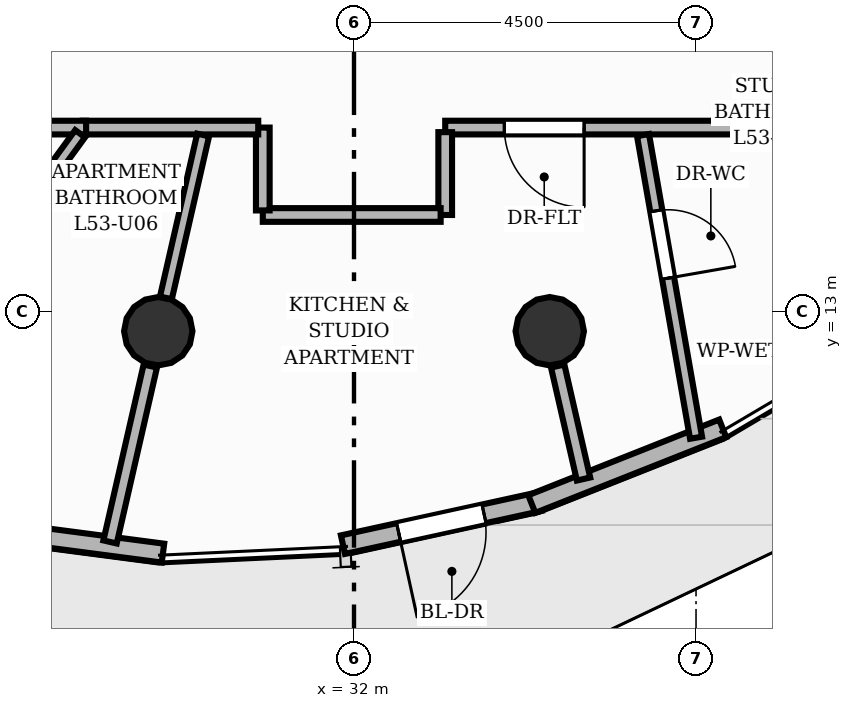
"""IFC4 building model, lengths in metres.
Left out: names, types, materials, properties, quantities, classifications, styles, units other than length and angle.
Written with IfcOpenShell. Run it as: python <this file> out.ifc"""

import sys

from ifc_helpers import new_model, si_unit, direction, frame, frame_2d, origin, origin_2d, place, context, subcontext, project, spatial, rectangle, circle, extrude, element, fill, save


model = new_model("IFC4")
c1 = context("Model", 3, precision=1e-05, world=origin(), true_north=direction((0.0, 1.0)))
c2 = subcontext(c1, "Body", "Model", "MODEL_VIEW")
j1 = project(units=[si_unit("LENGTHUNIT", "METRE"), si_unit("PLANEANGLEUNIT", "RADIAN")], contexts=[c1])
p1 = place(None, origin())
s1 = spatial("IfcSite", under=j1, at=p1, CompositionType="ELEMENT")
p2 = place(p1, origin())
s2 = spatial("IfcBuilding", under=s1, at=p2, CompositionType="ELEMENT")
p3 = place(p2, frame((0.0, 0.0, 179.04)))
s3 = spatial("IfcBuildingStorey", under=s2, at=p3, CompositionType="ELEMENT", Elevation=179.04)
for number, where, z_axis, x_axis in (
    (1, (29.425, 12.74, 0.0), (0.0, 0.0, 1.0), (1.0, 0.0, 0.0)),
    (2, (34.575, 12.74, 0.0), (0.0, 0.0, 1.0), (1.0, 0.0, 0.0)),
):
    element("IfcColumn", number, at=place(p3, frame(where, z_axis=z_axis, x_axis=x_axis)), inside=s3, PredefinedType="COLUMN", context=c2, shape_type="SweptSolid", body=[
        extrude(circle(Radius=0.45, at=origin_2d()), origin(), (0.0, 0.0, 1.0), 3.2),
    ])
p4 = place(p3, frame((29.487, 9.821, 0.0), z_axis=(0.0, 0.0, 1.0), x_axis=(-0.991491995227, 0.130167674176, 0.0)))
e3 = element("IfcWall", 3, at=p4, inside=s3, PredefinedType="SOLIDWALL", context=c2, shape_type="SweptSolid", body=[
    extrude(rectangle(XDim=2.532, YDim=0.25, at=frame_2d((1.266, 0.0))), origin(), (0.0, 0.0, 1.0), 2.96),
])
p5 = place(p3, frame((34.444, 10.499, 0.0), z_axis=(0.0, 0.0, 1.0), x_axis=(-0.976886196324, -0.213760051067, 0.0)))
e4 = element("IfcWall", 4, at=p5, inside=s3, PredefinedType="SOLIDWALL", context=c2, shape_type="SweptSolid", body=[
    extrude(rectangle(XDim=2.651, YDim=0.25, at=frame_2d((1.325, 0.0))), origin(), (0.0, 0.0, 1.0), 2.96),
])
p6 = place(p5, frame((0.751, 0.0, 0.0)))
e5 = element("IfcOpeningElement", 5, at=p6, cuts=e4, PredefinedType="OPENING", context=c2, shape_type="SweptSolid", body=[
    extrude(rectangle(XDim=1.15, YDim=2.2, at=frame_2d((0.575, 1.1))), frame((0.0, 0.135, 0.0), z_axis=(0.0, -1.0, 0.0), x_axis=(1.0, 0.0, 0.0)), (0.0, 0.0, 1.0), 0.27),
])
p7 = place(p3, frame((36.851, 11.462, 0.0), z_axis=(0.0, 0.0, 1.0), x_axis=(-0.929693178164, -0.368334894459, 0.0)))
e6 = element("IfcWall", 6, at=p7, inside=s3, PredefinedType="SOLIDWALL", context=c2, shape_type="SweptSolid", body=[
    extrude(rectangle(XDim=2.702, YDim=0.25, at=frame_2d((1.351, 0.0))), origin(), (0.0, 0.0, 1.0), 2.96),
])
p8 = place(p3, frame((29.32, 12.282, 0.0), z_axis=(0.0, 0.0, 1.0), x_axis=(-0.223011847659, -0.974815734282, 0.0)))
e7 = element("IfcWall", 7, at=p8, inside=s3, PredefinedType="PARTITIONING", context=c2, shape_type="SweptSolid", body=[
    extrude(rectangle(XDim=2.375, YDim=0.18, at=frame_2d((1.187, 0.0))), origin(), (0.0, 0.0, 1.0), 2.403),
])
p9 = place(p3, frame((34.68, 12.282, 0.0), z_axis=(0.0, 0.0, 1.0), x_axis=(0.222976920769, -0.974823723965, 0.0)))
e8 = element("IfcWall", 8, at=p9, inside=s3, PredefinedType="PARTITIONING", context=c2, shape_type="SweptSolid", body=[
    extrude(rectangle(XDim=1.525, YDim=0.18, at=frame_2d((0.763, 0.0))), origin(), (0.0, 0.0, 1.0), 2.403),
])
p10 = place(p3, frame((39.08, 15.42, 0.0), z_axis=(0.0, 0.0, 1.0), x_axis=(-1.0, 0.0, 0.0)))
e9 = element("IfcWall", 9, at=p10, inside=s3, PredefinedType="PARTITIONING", context=c2, shape_type="SweptSolid", body=[
    extrude(rectangle(XDim=5.88, YDim=0.18, at=frame_2d((2.94, 0.0))), origin(), (0.0, 0.0, 1.0), 2.955),
])
p11 = place(p10, frame((4.052, 0.0, 0.0)))
e10 = element("IfcOpeningElement", 10, at=p11, cuts=e9, PredefinedType="OPENING", context=c2, shape_type="SweptSolid", body=[
    extrude(rectangle(XDim=1.05, YDim=2.15, at=frame_2d((0.525, 1.075))), frame((0.0, 0.1, 0.0), z_axis=(0.0, -1.0, 0.0), x_axis=(1.0, 0.0, 0.0)), (0.0, 0.0, 1.0), 0.2),
])
p12 = place(p3, frame((33.2, 15.36, 0.0), z_axis=(0.0, 0.0, 1.0), x_axis=(0.0, -1.0, 0.0)))
e11 = element("IfcWall", 11, at=p12, inside=s3, PredefinedType="PARTITIONING", context=c2, shape_type="SweptSolid", body=[
    extrude(rectangle(XDim=1.09, YDim=0.18, at=frame_2d((0.545, 0.0))), origin(), (0.0, 0.0, 1.0), 2.955),
])
p13 = place(p3, frame((33.14, 14.27, 0.0), z_axis=(0.0, 0.0, 1.0), x_axis=(-1.0, 0.0, 0.0)))
e12 = element("IfcWall", 12, at=p13, inside=s3, PredefinedType="PARTITIONING", context=c2, shape_type="SweptSolid", body=[
    extrude(rectangle(XDim=2.34, YDim=0.18, at=frame_2d((1.17, 0.0))), origin(), (0.0, 0.0, 1.0), 2.955),
])
p14 = place(p3, frame((30.8, 14.33, 0.0), z_axis=(0.0, 0.0, 1.0), x_axis=(0.0, 1.0, 0.0)))
e13 = element("IfcWall", 13, at=p14, inside=s3, PredefinedType="PARTITIONING", context=c2, shape_type="SweptSolid", body=[
    extrude(rectangle(XDim=1.09, YDim=0.18, at=frame_2d((0.545, 0.0))), origin(), (0.0, 0.0, 1.0), 2.955),
])
p15 = place(p3, frame((30.74, 15.42, 0.0), z_axis=(0.0, 0.0, 1.0), x_axis=(-1.0, 0.0, 0.0)))
e14 = element("IfcWall", 14, at=p15, inside=s3, PredefinedType="PARTITIONING", context=c2, shape_type="SweptSolid", body=[
    extrude(rectangle(XDim=2.309, YDim=0.18, at=frame_2d((1.155, 0.0))), origin(), (0.0, 0.0, 1.0), 2.955),
])
p16 = place(p3, frame((28.475, 15.42, 0.0), z_axis=(0.0, 0.0, 1.0), x_axis=(-1.0, 0.0, 0.0)))
e15 = element("IfcWall", 15, at=p16, inside=s3, PredefinedType="PARTITIONING", context=c2, shape_type="SweptSolid", body=[
    extrude(rectangle(XDim=3.495, YDim=0.18, at=frame_2d((1.748, 0.0))), origin(), (0.0, 0.0, 1.0), 2.955),
])
p17 = place(p3, frame((35.802, 15.322, 0.0), z_axis=(0.0, 0.0, 1.0), x_axis=(0.172579535558, -0.98499558573, 0.0)))
e16 = element("IfcWall", 16, at=p17, inside=s3, PredefinedType="PLUMBINGWALL", context=c2, shape_type="SweptSolid", body=[
    extrude(rectangle(XDim=4.043, YDim=0.16, at=frame_2d((2.021, 0.0))), origin(), (0.0, 0.0, 1.0), 2.692),
])
p18 = place(p17, frame((1.011, 0.0, 0.0)))
e17 = element("IfcOpeningElement", 17, at=p18, cuts=e16, PredefinedType="OPENING", context=c2, shape_type="SweptSolid", body=[
    extrude(rectangle(XDim=0.9, YDim=2.1, at=frame_2d((0.45, 1.05))), frame((0.0, 0.09, 0.0), z_axis=(0.0, -1.0, 0.0), x_axis=(1.0, 0.0, 0.0)), (0.0, 0.0, 1.0), 0.18),
])
p19 = place(p3, frame((29.525, 13.179, 0.0), z_axis=(0.0, 0.0, 1.0), x_axis=(0.222969522248, 0.974825416241, 0.0)))
e18 = element("IfcWall", 18, at=p19, inside=s3, PredefinedType="PLUMBINGWALL", context=c2, shape_type="SweptSolid", body=[
    extrude(rectangle(XDim=2.199, YDim=0.16, at=frame_2d((1.099, 0.0))), origin(), (0.0, 0.0, 1.0), 2.403),
])
p20 = place(p3, frame((28.396, 15.339, 0.0), z_axis=(0.0, 0.0, 1.0), x_axis=(-0.588873823988, -0.808224980696, 0.0)))
e19 = element("IfcWall", 19, at=p20, inside=s3, PredefinedType="PLUMBINGWALL", context=c2, shape_type="SweptSolid", body=[
    extrude(rectangle(XDim=5.622, YDim=0.16, at=frame_2d((2.811, 0.0))), origin(), (0.0, 0.0, 1.0), 2.692),
])
p21 = place(p20, frame((2.361, 0.0, 0.0)))
e20 = element("IfcOpeningElement", 20, at=p21, cuts=e19, PredefinedType="OPENING", context=c2, shape_type="SweptSolid", body=[
    extrude(rectangle(XDim=0.9, YDim=2.1, at=frame_2d((0.45, 1.05))), frame((0.0, 0.09, 0.0), z_axis=(0.0, -1.0, 0.0), x_axis=(1.0, 0.0, 0.0)), (0.0, 0.0, 1.0), 0.18),
])
p22 = place(p6, origin())
e21 = element("IfcDoor", 21, at=p22, inside=s3, OperationType="SINGLE_SWING_RIGHT", PredefinedType="DOOR", context=c2, shape_type="SweptSolid", body=[
    extrude(rectangle(XDim=1.15, YDim=2.2, at=frame_2d((0.575, 1.1))), frame((0.0, 0.025, 0.0), z_axis=(0.0, -1.0, 0.0), x_axis=(1.0, 0.0, 0.0)), (0.0, 0.0, 1.0), 0.05),
])
fill(e5, e21)
p23 = place(p11, origin())
e22 = element("IfcDoor", 22, at=p23, inside=s3, OperationType="SINGLE_SWING_LEFT", PredefinedType="DOOR", context=c2, shape_type="SweptSolid", body=[
    extrude(rectangle(XDim=1.05, YDim=2.15, at=frame_2d((0.525, 1.075))), frame((0.0, 0.025, 0.0), z_axis=(0.0, -1.0, 0.0), x_axis=(1.0, 0.0, 0.0)), (0.0, 0.0, 1.0), 0.05),
])
fill(e10, e22)
p24 = place(p18, origin())
e23 = element("IfcDoor", 23, at=p24, inside=s3, OperationType="SINGLE_SWING_RIGHT", PredefinedType="DOOR", context=c2, shape_type="SweptSolid", body=[
    extrude(rectangle(XDim=0.9, YDim=2.1, at=frame_2d((0.45, 1.05))), frame((0.0, 0.025, 0.0), z_axis=(0.0, -1.0, 0.0), x_axis=(1.0, 0.0, 0.0)), (0.0, 0.0, 1.0), 0.05),
])
fill(e17, e23)
save(model, sys.argv[1])
